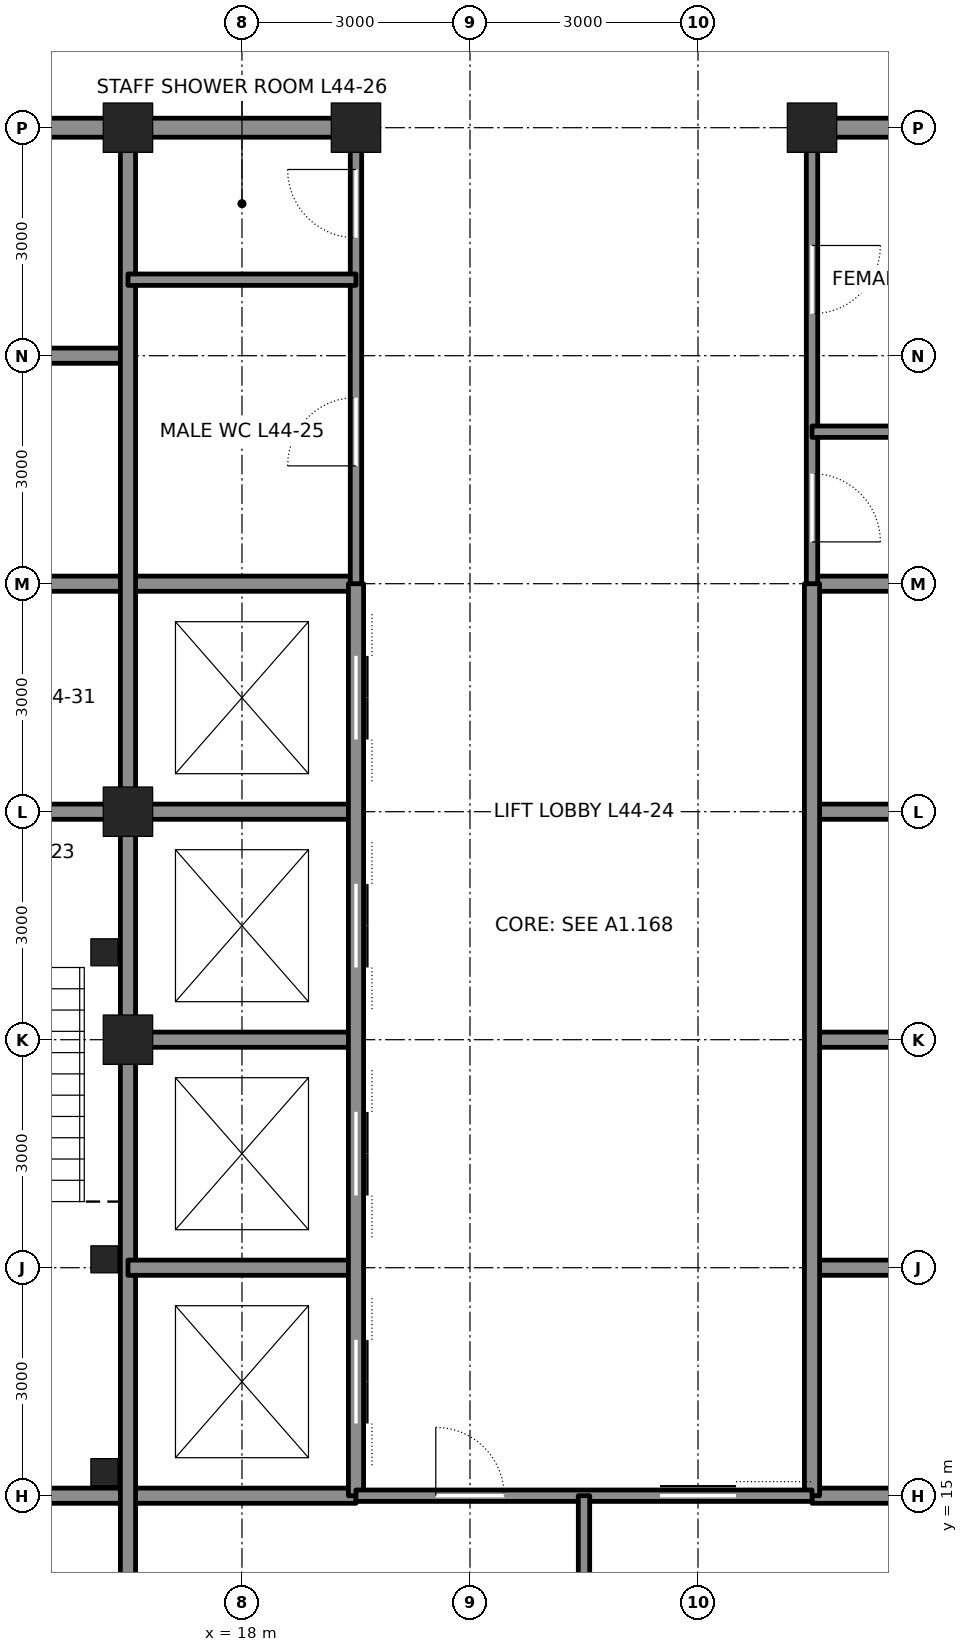
"""IFC4 building model, lengths in metres.
Left out: names, types, materials, properties, quantities, classifications, styles, units other than length and angle.
Written with IfcOpenShell. Run it as: python <this file> out.ifc"""

import sys

from ifc_helpers import new_model, si_unit, direction, frame, frame_2d, origin, origin_2d, place, context, subcontext, project, spatial, rectangle, hollow_rectangle, extrude, element, fill, save


model = new_model("IFC4")
c1 = context("Model", 3, precision=1e-05, world=origin(), true_north=direction((0.0, 1.0)))
c2 = subcontext(c1, "Body", "Model", "MODEL_VIEW")
j1 = project(units=[si_unit("LENGTHUNIT", "METRE"), si_unit("PLANEANGLEUNIT", "RADIAN")], contexts=[c1])
p1 = place(None, origin())
s1 = spatial("IfcSite", under=j1, at=p1, CompositionType="ELEMENT")
p2 = place(p1, origin())
s2 = spatial("IfcBuilding", under=s1, at=p2, CompositionType="ELEMENT")
p3 = place(p2, frame((0.0, 0.0, 201.3)))
s3 = spatial("IfcBuildingStorey", under=s2, at=p3, CompositionType="ELEMENT", Elevation=201.3)
for number, where, z_axis, x_axis in (
    (1, (16.5, 33.0, 0.0), (0.0, 0.0, 1.0), (1.0, 0.0, 0.0)),
    (2, (19.5, 33.0, 0.0), (0.0, 0.0, 1.0), (1.0, 0.0, 0.0)),
    (3, (25.5, 33.0, 0.0), (0.0, 0.0, 1.0), (1.0, 0.0, 0.0)),
    (4, (16.5, 21.0, 0.0), (0.0, 0.0, 1.0), (1.0, 0.0, 0.0)),
    (5, (16.5, 24.0, 0.0), (0.0, 0.0, 1.0), (1.0, 0.0, 0.0)),
):
    element("IfcColumn", number, at=place(p3, frame(where, z_axis=z_axis, x_axis=x_axis)), inside=s3, PredefinedType="COLUMN", context=c2, shape_type="SweptSolid", body=[
        extrude(hollow_rectangle(XDim=0.65, YDim=0.65, WallThickness=0.065, at=origin_2d()), origin(), (0.0, 0.0, 1.0), 4.2),
    ])
for number, where, z_axis, x_axis in (
    (6, (12.0, 15.0, 0.0), (0.0, 0.0, 1.0), (1.0, 0.0, 0.0)),
    (7, (25.5, 15.0, 0.0), (0.0, 0.0, 1.0), (1.0, 0.0, 0.0)),
):
    element("IfcWall", number, at=place(p3, frame(where, z_axis=z_axis, x_axis=x_axis)), inside=s3, PredefinedType="SOLIDWALL", context=c2, shape_type="SweptSolid", body=[
        extrude(rectangle(XDim=7.5, YDim=0.2, at=frame_2d((3.75, 0.0))), origin(), (0.0, 0.0, 1.0), 4.04),
    ])
p4 = place(p3, frame((12.25, 24.0, 0.0), z_axis=(0.0, 0.0, 1.0), x_axis=(1.0, 0.0, 0.0)))
e8 = element("IfcWall", 8, at=p4, inside=s3, PredefinedType="SOLIDWALL", context=c2, shape_type="SweptSolid", body=[
    extrude(rectangle(XDim=4.0, YDim=0.2, at=frame_2d((2.0, 0.0))), origin(), (0.0, 0.0, 1.0), 3.09),
])
p5 = place(p4, frame((1.4, 0.0, 0.0)))
e9 = element("IfcOpeningElement", 9, at=p5, cuts=e8, PredefinedType="OPENING", context=c2, shape_type="SweptSolid", body=[
    extrude(rectangle(XDim=1.2, YDim=2.1, at=frame_2d((0.6, 1.05))), frame((0.0, 0.11, 0.0), z_axis=(0.0, -1.0, 0.0), x_axis=(1.0, 0.0, 0.0)), (0.0, 0.0, 1.0), 0.22),
])
for number, where, z_axis, x_axis in (
    (10, (16.75, 24.0, 0.0), (0.0, 0.0, 1.0), (1.0, 0.0, 0.0)),
    (11, (25.5, 24.0, 0.0), (0.0, 0.0, 1.0), (1.0, 0.0, 0.0)),
):
    element("IfcWall", number, at=place(p3, frame(where, z_axis=z_axis, x_axis=x_axis)), inside=s3, PredefinedType="SOLIDWALL", context=c2, shape_type="SweptSolid", body=[
        extrude(rectangle(XDim=2.75, YDim=0.2, at=frame_2d((1.375, 0.0))), origin(), (0.0, 0.0, 1.0), 3.09),
    ])
p6 = place(p3, frame((12.0, 27.0, 0.0), z_axis=(0.0, 0.0, 1.0), x_axis=(1.0, 0.0, 0.0)))
e12 = element("IfcWall", 12, at=p6, inside=s3, PredefinedType="SOLIDWALL", context=c2, shape_type="SweptSolid", body=[
    extrude(rectangle(XDim=7.5, YDim=0.2, at=frame_2d((3.75, 0.0))), origin(), (0.0, 0.0, 1.0), 4.04),
])
p7 = place(p6, frame((1.65, 0.0, 0.0)))
e13 = element("IfcOpeningElement", 13, at=p7, cuts=e12, PredefinedType="OPENING", context=c2, shape_type="SweptSolid", body=[
    extrude(rectangle(XDim=1.2, YDim=2.1, at=frame_2d((0.6, 1.05))), frame((0.0, 0.11, 0.0), z_axis=(0.0, -1.0, 0.0), x_axis=(1.0, 0.0, 0.0)), (0.0, 0.0, 1.0), 0.22),
])
p8 = place(p3, frame((25.5, 27.0, 0.0), z_axis=(0.0, 0.0, 1.0), x_axis=(1.0, 0.0, 0.0)))
e14 = element("IfcWall", 14, at=p8, inside=s3, PredefinedType="SOLIDWALL", context=c2, shape_type="SweptSolid", body=[
    extrude(rectangle(XDim=3.0, YDim=0.2, at=frame_2d((1.5, 0.0))), origin(), (0.0, 0.0, 1.0), 4.04),
])
p9 = place(p3, frame((12.0, 30.0, 0.0), z_axis=(0.0, 0.0, 1.0), x_axis=(1.0, 0.0, 0.0)))
e15 = element("IfcWall", 15, at=p9, inside=s3, PredefinedType="SOLIDWALL", context=c2, shape_type="SweptSolid", body=[
    extrude(rectangle(XDim=4.5, YDim=0.2, at=frame_2d((2.25, 0.0))), origin(), (0.0, 0.0, 1.0), 4.04),
])
p10 = place(p3, frame((12.25, 33.0, 0.0), z_axis=(0.0, 0.0, 1.0), x_axis=(1.0, 0.0, 0.0)))
e16 = element("IfcWall", 16, at=p10, inside=s3, PredefinedType="SOLIDWALL", context=c2, shape_type="SweptSolid", body=[
    extrude(rectangle(XDim=4.0, YDim=0.25, at=frame_2d((2.0, 0.0))), origin(), (0.0, 0.0, 1.0), 3.181),
])
for number, where, z_axis, x_axis in (
    (17, (16.75, 33.0, 0.0), (0.0, 0.0, 1.0), (1.0, 0.0, 0.0)),
    (18, (25.75, 33.0, 0.0), (0.0, 0.0, 1.0), (1.0, 0.0, 0.0)),
):
    element("IfcWall", number, at=place(p3, frame(where, z_axis=z_axis, x_axis=x_axis)), inside=s3, PredefinedType="SOLIDWALL", context=c2, shape_type="SweptSolid", body=[
        extrude(rectangle(XDim=2.5, YDim=0.25, at=frame_2d((1.25, 0.0))), origin(), (0.0, 0.0, 1.0), 3.181),
    ])
p11 = place(p3, frame((16.5, 12.25, 0.0), z_axis=(0.0, 0.0, 1.0), x_axis=(0.0, 1.0, 0.0)))
e19 = element("IfcWall", 19, at=p11, inside=s3, PredefinedType="SOLIDWALL", context=c2, shape_type="SweptSolid", body=[
    extrude(rectangle(XDim=8.5, YDim=0.2, at=frame_2d((4.25, 0.0))), origin(), (0.0, 0.0, 1.0), 3.113),
])
p12 = place(p3, frame((16.5, 21.25, 0.0), z_axis=(0.0, 0.0, 1.0), x_axis=(0.0, 1.0, 0.0)))
e20 = element("IfcWall", 20, at=p12, inside=s3, PredefinedType="SOLIDWALL", context=c2, shape_type="SweptSolid", body=[
    extrude(rectangle(XDim=2.5, YDim=0.2, at=frame_2d((1.25, 0.0))), origin(), (0.0, 0.0, 1.0), 3.113),
])
p13 = place(p3, frame((16.5, 24.25, 0.0), z_axis=(0.0, 0.0, 1.0), x_axis=(0.0, 1.0, 0.0)))
e21 = element("IfcWall", 21, at=p13, inside=s3, PredefinedType="SOLIDWALL", context=c2, shape_type="SweptSolid", body=[
    extrude(rectangle(XDim=8.5, YDim=0.2, at=frame_2d((4.25, 0.0))), origin(), (0.0, 0.0, 1.0), 3.113),
])
p14 = place(p3, frame((16.5, 18.0, 0.0), z_axis=(0.0, 0.0, 1.0), x_axis=(1.0, 0.0, 0.0)))
e22 = element("IfcWall", 22, at=p14, inside=s3, PredefinedType="SOLIDWALL", context=c2, shape_type="SweptSolid", body=[
    extrude(rectangle(XDim=3.0, YDim=0.2, at=frame_2d((1.5, 0.0))), origin(), (0.0, 0.0, 1.0), 4.04),
])
p15 = place(p3, frame((25.5, 18.0, 0.0), z_axis=(0.0, 0.0, 1.0), x_axis=(1.0, 0.0, 0.0)))
e23 = element("IfcWall", 23, at=p15, inside=s3, PredefinedType="SOLIDWALL", context=c2, shape_type="SweptSolid", body=[
    extrude(rectangle(XDim=7.5, YDim=0.2, at=frame_2d((3.75, 0.0))), origin(), (0.0, 0.0, 1.0), 4.04),
])
p16 = place(p15, frame((4.65, 0.0, 0.0)))
e24 = element("IfcOpeningElement", 24, at=p16, cuts=e23, PredefinedType="OPENING", context=c2, shape_type="SweptSolid", body=[
    extrude(rectangle(XDim=1.2, YDim=2.1, at=frame_2d((0.6, 1.05))), frame((0.0, 0.11, 0.0), z_axis=(0.0, -1.0, 0.0), x_axis=(1.0, 0.0, 0.0)), (0.0, 0.0, 1.0), 0.22),
])
for number, where, z_axis, x_axis in (
    (25, (16.75, 21.0, 0.0), (0.0, 0.0, 1.0), (1.0, 0.0, 0.0)),
    (26, (25.5, 21.0, 0.0), (0.0, 0.0, 1.0), (1.0, 0.0, 0.0)),
):
    element("IfcWall", number, at=place(p3, frame(where, z_axis=z_axis, x_axis=x_axis)), inside=s3, PredefinedType="SOLIDWALL", context=c2, shape_type="SweptSolid", body=[
        extrude(rectangle(XDim=2.75, YDim=0.2, at=frame_2d((1.375, 0.0))), origin(), (0.0, 0.0, 1.0), 3.09),
    ])
p17 = place(p3, frame((19.5, 15.0, 0.0), z_axis=(0.0, 0.0, 1.0), x_axis=(0.0, 1.0, 0.0)))
e27 = element("IfcWall", 27, at=p17, inside=s3, PredefinedType="SOLIDWALL", context=c2, shape_type="SweptSolid", body=[
    extrude(rectangle(XDim=12.0, YDim=0.2, at=frame_2d((6.0, 0.0))), origin(), (0.0, 0.0, 1.0), 3.064),
])
p18 = place(p17, frame((0.95, 0.0, 0.0)))
e28 = element("IfcOpeningElement", 28, at=p18, cuts=e27, PredefinedType="OPENING", context=c2, shape_type="SweptSolid", body=[
    extrude(rectangle(XDim=1.1, YDim=2.1, at=frame_2d((0.55, 1.05))), frame((0.0, 0.11, 0.0), z_axis=(0.0, -1.0, 0.0), x_axis=(1.0, 0.0, 0.0)), (0.0, 0.0, 1.0), 0.22),
])
p19 = place(p17, frame((3.95, 0.0, 0.0)))
e29 = element("IfcOpeningElement", 29, at=p19, cuts=e27, PredefinedType="OPENING", context=c2, shape_type="SweptSolid", body=[
    extrude(rectangle(XDim=1.1, YDim=2.1, at=frame_2d((0.55, 1.05))), frame((0.0, 0.11, 0.0), z_axis=(0.0, -1.0, 0.0), x_axis=(1.0, 0.0, 0.0)), (0.0, 0.0, 1.0), 0.22),
])
p20 = place(p17, frame((6.95, 0.0, 0.0)))
e30 = element("IfcOpeningElement", 30, at=p20, cuts=e27, PredefinedType="OPENING", context=c2, shape_type="SweptSolid", body=[
    extrude(rectangle(XDim=1.1, YDim=2.1, at=frame_2d((0.55, 1.05))), frame((0.0, 0.11, 0.0), z_axis=(0.0, -1.0, 0.0), x_axis=(1.0, 0.0, 0.0)), (0.0, 0.0, 1.0), 0.22),
])
p21 = place(p17, frame((9.95, 0.0, 0.0)))
e31 = element("IfcOpeningElement", 31, at=p21, cuts=e27, PredefinedType="OPENING", context=c2, shape_type="SweptSolid", body=[
    extrude(rectangle(XDim=1.1, YDim=2.1, at=frame_2d((0.55, 1.05))), frame((0.0, 0.11, 0.0), z_axis=(0.0, -1.0, 0.0), x_axis=(1.0, 0.0, 0.0)), (0.0, 0.0, 1.0), 0.22),
])
p22 = place(p3, frame((19.5, 27.0, 0.0), z_axis=(0.0, 0.0, 1.0), x_axis=(0.0, 1.0, 0.0)))
e32 = element("IfcWall", 32, at=p22, inside=s3, PredefinedType="PARTITIONING", context=c2, shape_type="SweptSolid", body=[
    extrude(rectangle(XDim=5.75, YDim=0.15, at=frame_2d((2.875, 0.0))), origin(), (0.0, 0.0, 1.0), 3.064),
])
p23 = place(p22, frame((1.55, 0.0, 0.0)))
e33 = element("IfcOpeningElement", 33, at=p23, cuts=e32, PredefinedType="OPENING", context=c2, shape_type="SweptSolid", body=[
    extrude(rectangle(XDim=0.9, YDim=2.1, at=frame_2d((0.45, 1.05))), frame((0.0, 0.085, 0.0), z_axis=(0.0, -1.0, 0.0), x_axis=(1.0, 0.0, 0.0)), (0.0, 0.0, 1.0), 0.17),
])
p24 = place(p22, frame((4.55, 0.0, 0.0)))
e34 = element("IfcOpeningElement", 34, at=p24, cuts=e32, PredefinedType="OPENING", context=c2, shape_type="SweptSolid", body=[
    extrude(rectangle(XDim=0.9, YDim=2.1, at=frame_2d((0.45, 1.05))), frame((0.0, 0.085, 0.0), z_axis=(0.0, -1.0, 0.0), x_axis=(1.0, 0.0, 0.0)), (0.0, 0.0, 1.0), 0.17),
])
p25 = place(p3, frame((25.5, 15.0, 0.0), z_axis=(0.0, 0.0, 1.0), x_axis=(0.0, 1.0, 0.0)))
e35 = element("IfcWall", 35, at=p25, inside=s3, PredefinedType="SOLIDWALL", context=c2, shape_type="SweptSolid", body=[
    extrude(rectangle(XDim=12.0, YDim=0.2, at=frame_2d((6.0, 0.0))), origin(), (0.0, 0.0, 1.0), 3.064),
])
p26 = place(p3, frame((25.5, 27.0, 0.0), z_axis=(0.0, 0.0, 1.0), x_axis=(0.0, 1.0, 0.0)))
e36 = element("IfcWall", 36, at=p26, inside=s3, PredefinedType="PARTITIONING", context=c2, shape_type="SweptSolid", body=[
    extrude(rectangle(XDim=5.75, YDim=0.15, at=frame_2d((2.875, 0.0))), origin(), (0.0, 0.0, 1.0), 3.064),
])
p27 = place(p26, frame((0.55, 0.0, 0.0)))
e37 = element("IfcOpeningElement", 37, at=p27, cuts=e36, PredefinedType="OPENING", context=c2, shape_type="SweptSolid", body=[
    extrude(rectangle(XDim=0.9, YDim=2.1, at=frame_2d((0.45, 1.05))), frame((0.0, 0.085, 0.0), z_axis=(0.0, -1.0, 0.0), x_axis=(1.0, 0.0, 0.0)), (0.0, 0.0, 1.0), 0.17),
])
p28 = place(p26, frame((3.55, 0.0, 0.0)))
e38 = element("IfcOpeningElement", 38, at=p28, cuts=e36, PredefinedType="OPENING", context=c2, shape_type="SweptSolid", body=[
    extrude(rectangle(XDim=0.9, YDim=2.1, at=frame_2d((0.45, 1.05))), frame((0.0, 0.085, 0.0), z_axis=(0.0, -1.0, 0.0), x_axis=(1.0, 0.0, 0.0)), (0.0, 0.0, 1.0), 0.17),
])
p29 = place(p3, frame((19.5, 15.0, 0.0), z_axis=(0.0, 0.0, 1.0), x_axis=(1.0, 0.0, 0.0)))
e39 = element("IfcWall", 39, at=p29, inside=s3, PredefinedType="PARTITIONING", context=c2, shape_type="SweptSolid", body=[
    extrude(rectangle(XDim=6.0, YDim=0.15, at=frame_2d((3.0, 0.0))), origin(), (0.0, 0.0, 1.0), 4.04),
])
p30 = place(p29, frame((4.0, 0.0, 0.0)))
e40 = element("IfcOpeningElement", 40, at=p30, cuts=e39, PredefinedType="OPENING", context=c2, shape_type="SweptSolid", body=[
    extrude(rectangle(XDim=1.0, YDim=2.1, at=frame_2d((0.5, 1.05))), frame((0.0, 0.085, 0.0), z_axis=(0.0, -1.0, 0.0), x_axis=(1.0, 0.0, 0.0)), (0.0, 0.0, 1.0), 0.17),
])
p31 = place(p29, frame((1.05, 0.0, 0.0)))
e41 = element("IfcOpeningElement", 41, at=p31, cuts=e39, PredefinedType="OPENING", context=c2, shape_type="SweptSolid", body=[
    extrude(rectangle(XDim=0.9, YDim=2.1, at=frame_2d((0.45, 1.05))), frame((0.0, 0.085, 0.0), z_axis=(0.0, -1.0, 0.0), x_axis=(1.0, 0.0, 0.0)), (0.0, 0.0, 1.0), 0.17),
])
for number, where, z_axis, x_axis in (
    (42, (22.5, 15.0, 0.0), (0.0, 0.0, 1.0), (0.0, -1.0, 0.0)),
    (43, (16.5, 31.0, 0.0), (0.0, 0.0, 1.0), (1.0, 0.0, 0.0)),
    (44, (25.5, 29.0, 0.0), (0.0, 0.0, 1.0), (1.0, 0.0, 0.0)),
):
    element("IfcWall", number, at=place(p3, frame(where, z_axis=z_axis, x_axis=x_axis)), inside=s3, PredefinedType="PARTITIONING", context=c2, shape_type="SweptSolid", body=[
        extrude(rectangle(XDim=3.0, YDim=0.15, at=frame_2d((1.5, 0.0))), origin(), (0.0, 0.0, 1.0), 4.04),
    ])
for number, where, z_axis, x_axis in (
    (45, (16.19, 15.31, 0.0), (0.0, 0.0, 1.0), (1.0, 0.0, 0.0)),
    (46, (16.19, 18.11, 0.0), (0.0, 0.0, 1.0), (1.0, 0.0, 0.0)),
    (47, (16.19, 22.15, 0.0), (0.0, 0.0, 1.0), (1.0, 0.0, 0.0)),
):
    element("IfcColumn", number, at=place(p3, frame(where, z_axis=z_axis, x_axis=x_axis)), inside=s3, PredefinedType="COLUMN", context=c2, shape_type="SweptSolid", body=[
        extrude(hollow_rectangle(XDim=0.356, YDim=0.356, WallThickness=0.009, at=origin_2d()), origin(), (0.0, 0.0, 1.0), 4.2),
    ])
p32 = place(p23, origin())
e48 = element("IfcDoor", 48, at=p32, inside=s3, OperationType="SINGLE_SWING_LEFT", PredefinedType="DOOR", context=c2, shape_type="SweptSolid", body=[
    extrude(rectangle(XDim=0.9, YDim=2.1, at=frame_2d((0.45, 1.05))), frame((0.0, 0.025, 0.0), z_axis=(0.0, -1.0, 0.0), x_axis=(1.0, 0.0, 0.0)), (0.0, 0.0, 1.0), 0.05),
])
fill(e33, e48)
p33 = place(p24, origin())
e49 = element("IfcDoor", 49, at=p33, inside=s3, OperationType="SINGLE_SWING_RIGHT", PredefinedType="DOOR", context=c2, shape_type="SweptSolid", body=[
    extrude(rectangle(XDim=0.9, YDim=2.1, at=frame_2d((0.45, 1.05))), frame((0.0, 0.025, 0.0), z_axis=(0.0, -1.0, 0.0), x_axis=(1.0, 0.0, 0.0)), (0.0, 0.0, 1.0), 0.05),
])
fill(e34, e49)
p34 = place(p27, frame((0.9, 0.0, 0.0), z_axis=(0.0, 0.0, 1.0), x_axis=(-1.0, 0.0, 0.0)))
e50 = element("IfcDoor", 50, at=p34, inside=s3, OperationType="SINGLE_SWING_RIGHT", PredefinedType="DOOR", context=c2, shape_type="SweptSolid", body=[
    extrude(rectangle(XDim=0.9, YDim=2.1, at=frame_2d((0.45, 1.05))), frame((0.0, 0.025, 0.0), z_axis=(0.0, -1.0, 0.0), x_axis=(1.0, 0.0, 0.0)), (0.0, 0.0, 1.0), 0.05),
])
fill(e37, e50)
p35 = place(p28, frame((0.9, 0.0, 0.0), z_axis=(0.0, 0.0, 1.0), x_axis=(-1.0, 0.0, 0.0)))
e51 = element("IfcDoor", 51, at=p35, inside=s3, OperationType="SINGLE_SWING_LEFT", PredefinedType="DOOR", context=c2, shape_type="SweptSolid", body=[
    extrude(rectangle(XDim=0.9, YDim=2.1, at=frame_2d((0.45, 1.05))), frame((0.0, 0.025, 0.0), z_axis=(0.0, -1.0, 0.0), x_axis=(1.0, 0.0, 0.0)), (0.0, 0.0, 1.0), 0.05),
])
fill(e38, e51)
p36 = place(p30, origin())
e52 = element("IfcDoor", 52, at=p36, inside=s3, OperationType="SLIDING_TO_LEFT", PredefinedType="DOOR", context=c2, shape_type="SweptSolid", body=[
    extrude(rectangle(XDim=1.0, YDim=2.1, at=frame_2d((0.5, 1.05))), frame((0.0, 0.025, 0.0), z_axis=(0.0, -1.0, 0.0), x_axis=(1.0, 0.0, 0.0)), (0.0, 0.0, 1.0), 0.05),
])
fill(e40, e52)
p37 = place(p31, origin())
e53 = element("IfcDoor", 53, at=p37, inside=s3, OperationType="SINGLE_SWING_LEFT", PredefinedType="DOOR", context=c2, shape_type="SweptSolid", body=[
    extrude(rectangle(XDim=0.9, YDim=2.1, at=frame_2d((0.45, 1.05))), frame((0.0, 0.025, 0.0), z_axis=(0.0, -1.0, 0.0), x_axis=(1.0, 0.0, 0.0)), (0.0, 0.0, 1.0), 0.05),
])
fill(e41, e53)
p38 = place(p18, origin())
e54 = element("IfcDoor", 54, at=p38, inside=s3, OperationType="DOUBLE_DOOR_SLIDING", PredefinedType="DOOR", context=c2, shape_type="SweptSolid", body=[
    extrude(rectangle(XDim=1.1, YDim=2.1, at=frame_2d((0.55, 1.05))), frame((0.0, 0.025, 0.0), z_axis=(0.0, -1.0, 0.0), x_axis=(1.0, 0.0, 0.0)), (0.0, 0.0, 1.0), 0.05),
])
fill(e28, e54)
p39 = place(p19, origin())
e55 = element("IfcDoor", 55, at=p39, inside=s3, OperationType="DOUBLE_DOOR_SLIDING", PredefinedType="DOOR", context=c2, shape_type="SweptSolid", body=[
    extrude(rectangle(XDim=1.1, YDim=2.1, at=frame_2d((0.55, 1.05))), frame((0.0, 0.025, 0.0), z_axis=(0.0, -1.0, 0.0), x_axis=(1.0, 0.0, 0.0)), (0.0, 0.0, 1.0), 0.05),
])
fill(e29, e55)
p40 = place(p20, origin())
e56 = element("IfcDoor", 56, at=p40, inside=s3, OperationType="DOUBLE_DOOR_SLIDING", PredefinedType="DOOR", context=c2, shape_type="SweptSolid", body=[
    extrude(rectangle(XDim=1.1, YDim=2.1, at=frame_2d((0.55, 1.05))), frame((0.0, 0.025, 0.0), z_axis=(0.0, -1.0, 0.0), x_axis=(1.0, 0.0, 0.0)), (0.0, 0.0, 1.0), 0.05),
])
fill(e30, e56)
p41 = place(p21, origin())
e57 = element("IfcDoor", 57, at=p41, inside=s3, OperationType="DOUBLE_DOOR_SLIDING", PredefinedType="DOOR", context=c2, shape_type="SweptSolid", body=[
    extrude(rectangle(XDim=1.1, YDim=2.1, at=frame_2d((0.55, 1.05))), frame((0.0, 0.025, 0.0), z_axis=(0.0, -1.0, 0.0), x_axis=(1.0, 0.0, 0.0)), (0.0, 0.0, 1.0), 0.05),
])
fill(e31, e57)
save(model, sys.argv[1])
